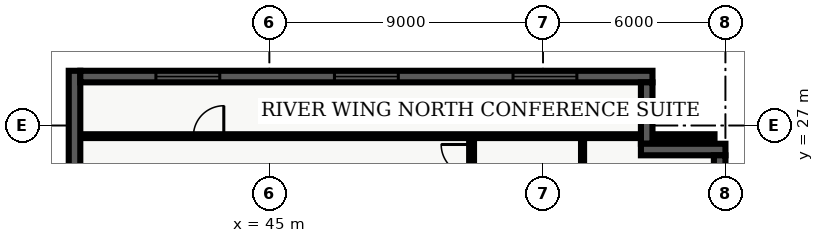
"""IFC4 building model, lengths in metres.
Left out: names, types, materials, properties, quantities, classifications, styles, units other than length and angle.
Written with IfcOpenShell. Run it as: python <this file> out.ifc"""

import sys

from ifc_helpers import new_model, entity, si_unit, converted_unit, direction, frame, origin_with_axes, origin_2d_with_axis, place, context, subcontext, project, spatial, polyline, rectangle, outline, extrude, element, fill, save


model = new_model("IFC4")
c1 = context("Model", 3, precision=1e-05, world=origin_with_axes(), true_north=direction((0.0, 1.0)))
c2 = subcontext(c1, "Body", "Model", "MODEL_VIEW")
j1 = project(units=[si_unit("LENGTHUNIT", "METRE"), converted_unit("PLANEANGLEUNIT", "DEGREE", entity("IfcPlaneAngleMeasure", 0.017), si_unit("PLANEANGLEUNIT", "RADIAN"), dimensions=[0, 0, 0, 0, 0, 0, 0])], contexts=[c1])
p1 = place(None, origin_with_axes())
s1 = spatial("IfcSite", under=j1, at=p1, CompositionType="ELEMENT")
p2 = place(p1, origin_with_axes())
s2 = spatial("IfcBuilding", under=s1, at=p2, CompositionType="ELEMENT")
p3 = place(p2, frame((0.0, 0.0, 44.4), z_axis=(0.0, 0.0, 1.0), x_axis=(1.0, 0.0, 0.0)))
s3 = spatial("IfcBuildingStorey", under=s2, at=p3, CompositionType="ELEMENT", Elevation=44.4)
p4 = place(p3, frame((51.65, 7.85, 0.0), z_axis=(0.0, 0.0, 1.0), x_axis=(0.0, 1.0, 0.0)))
e1 = element("IfcWall", 1, at=p4, inside=s3, PredefinedType="PARTITIONING", context=c2, shape_type="SweptSolid", body=[
    extrude(outline(polyline([(0.0, -0.08), (18.8, -0.08), (18.8, 0.08), (0.0, 0.08), (0.0, -0.08)])), origin_with_axes(), (0.0, 0.0, 1.0), 2.7),
])
p5 = place(p4, frame((0.703, 0.0, 0.0), z_axis=(0.0, 0.0, 1.0), x_axis=(1.0, 0.0, 0.0)))
e2 = element("IfcOpeningElement", 2, at=p5, cuts=e1, PredefinedType="OPENING", context=c2, shape_type="SweptSolid", body=[
    extrude(rectangle(XDim=0.9, YDim=0.18, at=origin_2d_with_axis()), origin_with_axes(), (0.0, 0.0, 1.0), 2.15),
])
p6 = place(p4, frame((5.962, 0.0, 0.0), z_axis=(0.0, 0.0, 1.0), x_axis=(1.0, 0.0, 0.0)))
e3 = element("IfcOpeningElement", 3, at=p6, cuts=e1, PredefinedType="OPENING", context=c2, shape_type="SweptSolid", body=[
    extrude(rectangle(XDim=1.0, YDim=0.18, at=origin_2d_with_axis()), origin_with_axes(), (0.0, 0.0, 1.0), 2.15),
])
p7 = place(p4, frame((11.795, 0.0, 0.0), z_axis=(0.0, 0.0, 1.0), x_axis=(1.0, 0.0, 0.0)))
e4 = element("IfcOpeningElement", 4, at=p7, cuts=e1, PredefinedType="OPENING", context=c2, shape_type="SweptSolid", body=[
    extrude(rectangle(XDim=1.0, YDim=0.18, at=origin_2d_with_axis()), origin_with_axes(), (0.0, 0.0, 1.0), 2.15),
])
p8 = place(p4, frame((18.026, 0.0, 0.0), z_axis=(0.0, 0.0, 1.0), x_axis=(1.0, 0.0, 0.0)))
e5 = element("IfcOpeningElement", 5, at=p8, cuts=e1, PredefinedType="OPENING", context=c2, shape_type="SweptSolid", body=[
    extrude(rectangle(XDim=1.0, YDim=0.18, at=origin_2d_with_axis()), origin_with_axes(), (0.0, 0.0, 1.0), 2.15),
])
p9 = place(p3, frame((38.76, 26.65, 0.0), z_axis=(0.0, 0.0, 1.0), x_axis=(1.0, 0.0, 0.0)))
e6 = element("IfcWall", 6, at=p9, inside=s3, PredefinedType="PARTITIONING", context=c2, shape_type="SweptSolid", body=[
    extrude(outline(polyline([(0.0, -0.062), (20.88, -0.062), (20.88, 0.062), (0.0, 0.062), (0.0, -0.062)])), origin_with_axes(), (0.0, 0.0, 1.0), 2.7),
])
p10 = place(p9, frame((4.24, 0.0, 0.0), z_axis=(0.0, 0.0, 1.0), x_axis=(1.0, 0.0, 0.0)))
e7 = element("IfcOpeningElement", 7, at=p10, cuts=e6, PredefinedType="OPENING", context=c2, shape_type="SweptSolid", body=[
    extrude(rectangle(XDim=1.0, YDim=0.145, at=origin_2d_with_axis()), origin_with_axes(), (0.0, 0.0, 1.0), 2.15),
])
p11 = place(p3, frame((55.3, 7.98, 0.0), z_axis=(0.0, 0.0, 1.0), x_axis=(0.0, 1.0, 0.0)))
e8 = element("IfcWall", 8, at=p11, inside=s3, PredefinedType="PARTITIONING", context=c2, shape_type="SweptSolid", body=[
    extrude(outline(polyline([(0.0, -0.05), (18.54, -0.05), (18.54, 0.05), (0.0, 0.05), (0.0, -0.05)])), origin_with_axes(), (0.0, 0.0, 1.0), 2.7),
])
p12 = place(p11, frame((1.823, 0.0, 0.0), z_axis=(0.0, 0.0, 1.0), x_axis=(1.0, 0.0, 0.0)))
e9 = element("IfcOpeningElement", 9, at=p12, cuts=e8, PredefinedType="OPENING", context=c2, shape_type="SweptSolid", body=[
    extrude(rectangle(XDim=0.95, YDim=0.12, at=origin_2d_with_axis()), origin_with_axes(), (0.0, 0.0, 1.0), 2.15),
])
p13 = place(p11, frame((5.832, 0.0, 0.0), z_axis=(0.0, 0.0, 1.0), x_axis=(1.0, 0.0, 0.0)))
e10 = element("IfcOpeningElement", 10, at=p13, cuts=e8, PredefinedType="OPENING", context=c2, shape_type="SweptSolid", body=[
    extrude(rectangle(XDim=0.95, YDim=0.12, at=origin_2d_with_axis()), origin_with_axes(), (0.0, 0.0, 1.0), 2.15),
])
p14 = place(p11, frame((10.415, 0.0, 0.0), z_axis=(0.0, 0.0, 1.0), x_axis=(1.0, 0.0, 0.0)))
e11 = element("IfcOpeningElement", 11, at=p14, cuts=e8, PredefinedType="OPENING", context=c2, shape_type="SweptSolid", body=[
    extrude(rectangle(XDim=0.95, YDim=0.12, at=origin_2d_with_axis()), origin_with_axes(), (0.0, 0.0, 1.0), 2.15),
])
p15 = place(p11, frame((15.745, 0.0, 0.0), z_axis=(0.0, 0.0, 1.0), x_axis=(1.0, 0.0, 0.0)))
e12 = element("IfcOpeningElement", 12, at=p15, cuts=e8, PredefinedType="OPENING", context=c2, shape_type="SweptSolid", body=[
    extrude(rectangle(XDim=0.95, YDim=0.12, at=origin_2d_with_axis()), origin_with_axes(), (0.0, 0.0, 1.0), 2.15),
])
p16 = place(p3, frame((38.59, 21.22, 0.0), z_axis=(0.0, 0.0, 1.0), x_axis=(0.0, 1.0, 0.0)))
e13 = element("IfcWall", 13, at=p16, inside=s3, PredefinedType="SOLIDWALL", context=c2, shape_type="SweptSolid", body=[
    extrude(outline(polyline([(0.0, -0.19), (7.58, -0.19), (7.58, 0.19), (0.0, 0.19), (0.0, -0.19)])), origin_with_axes(), (0.0, 0.0, 1.0), 3.66),
])
p17 = place(p3, frame((38.78, 28.61, 0.0), z_axis=(0.0, 0.0, 1.0), x_axis=(1.0, 0.0, 0.0)))
e14 = element("IfcWall", 14, at=p17, inside=s3, PredefinedType="SOLIDWALL", context=c2, shape_type="SweptSolid", body=[
    extrude(outline(polyline([(0.0, -0.19), (18.82, -0.19), (18.82, 0.19), (0.0, 0.19), (0.0, -0.19)])), origin_with_axes(), (0.0, 0.0, 1.0), 3.66),
])
p18 = place(p17, frame((3.537, 0.0, 0.45), z_axis=(0.0, 0.0, 1.0), x_axis=(1.0, 0.0, 0.0)))
e15 = element("IfcOpeningElement", 15, at=p18, cuts=e14, PredefinedType="OPENING", context=c2, shape_type="SweptSolid", body=[
    extrude(rectangle(XDim=2.1, YDim=0.4, at=origin_2d_with_axis()), origin_with_axes(), (0.0, 0.0, 1.0), 2.2),
])
p19 = place(p17, frame((9.41, 0.0, 0.45), z_axis=(0.0, 0.0, 1.0), x_axis=(1.0, 0.0, 0.0)))
e16 = element("IfcOpeningElement", 16, at=p19, cuts=e14, PredefinedType="OPENING", context=c2, shape_type="SweptSolid", body=[
    extrude(rectangle(XDim=2.1, YDim=0.4, at=origin_2d_with_axis()), origin_with_axes(), (0.0, 0.0, 1.0), 2.2),
])
p20 = place(p17, frame((15.283, 0.0, 0.45), z_axis=(0.0, 0.0, 1.0), x_axis=(1.0, 0.0, 0.0)))
e17 = element("IfcOpeningElement", 17, at=p20, cuts=e14, PredefinedType="OPENING", context=c2, shape_type="SweptSolid", body=[
    extrude(rectangle(XDim=2.1, YDim=0.4, at=origin_2d_with_axis()), origin_with_axes(), (0.0, 0.0, 1.0), 2.2),
])
p21 = place(p3, frame((57.41, 28.42, 0.0), z_axis=(0.0, 0.0, 1.0), x_axis=(0.0, -1.0, 0.0)))
e18 = element("IfcWall", 18, at=p21, inside=s3, PredefinedType="SOLIDWALL", context=c2, shape_type="SweptSolid", body=[
    extrude(outline(polyline([(0.0, -0.19), (2.02, -0.19), (2.02, 0.19), (0.0, 0.19), (0.0, -0.19)])), origin_with_axes(), (0.0, 0.0, 1.0), 3.66),
])
p22 = place(p3, frame((57.22, 26.21, 0.0), z_axis=(0.0, 0.0, 1.0), x_axis=(1.0, 0.0, 0.0)))
e19 = element("IfcWall", 19, at=p22, inside=s3, PredefinedType="SOLIDWALL", context=c2, shape_type="SweptSolid", body=[
    extrude(outline(polyline([(0.0, -0.19), (2.78, -0.19), (2.78, 0.19), (0.0, 0.19), (0.0, -0.19)])), origin_with_axes(), (0.0, 0.0, 1.0), 3.66),
])
p23 = place(p3, frame((59.81, 26.02, 0.0), z_axis=(0.0, 0.0, 1.0), x_axis=(0.0, -1.0, 0.0)))
e20 = element("IfcWall", 20, at=p23, inside=s3, PredefinedType="SOLIDWALL", context=c2, shape_type="SweptSolid", body=[
    extrude(outline(polyline([(0.0, -0.19), (23.62, -0.19), (23.62, 0.19), (0.0, 0.19), (0.0, -0.19)])), origin_with_axes(), (0.0, 0.0, 1.0), 3.66),
])
p24 = place(p23, frame((20.218, 0.0, 0.45), z_axis=(0.0, 0.0, 1.0), x_axis=(1.0, 0.0, 0.0)))
e21 = element("IfcOpeningElement", 21, at=p24, cuts=e20, PredefinedType="OPENING", context=c2, shape_type="SweptSolid", body=[
    extrude(rectangle(XDim=2.1, YDim=0.4, at=origin_2d_with_axis()), origin_with_axes(), (0.0, 0.0, 1.0), 2.2),
])
p25 = place(p9, frame((4.24, 0.0, 0.0), z_axis=(0.0, 0.0, 1.0), x_axis=(1.0, 0.0, 0.0)))
e22 = element("IfcDoor", 22, at=p25, inside=s3, OperationType="SINGLE_SWING_RIGHT", PredefinedType="DOOR", context=c2, shape_type="SweptSolid", body=[
    extrude(rectangle(XDim=1.0, YDim=0.075, at=origin_2d_with_axis()), origin_with_axes(), (0.0, 0.0, 1.0), 2.15),
])
fill(e7, e22)
p26 = place(p4, frame((18.026, 0.0, 0.0), z_axis=(0.0, 0.0, 1.0), x_axis=(1.0, 0.0, 0.0)))
e23 = element("IfcDoor", 23, at=p26, inside=s3, OperationType="SINGLE_SWING_RIGHT", PredefinedType="DOOR", context=c2, shape_type="SweptSolid", body=[
    extrude(rectangle(XDim=1.0, YDim=0.09, at=origin_2d_with_axis()), origin_with_axes(), (0.0, 0.0, 1.0), 2.15),
])
fill(e5, e23)
p27 = place(p17, frame((3.537, 0.0, 0.45), z_axis=(0.0, 0.0, 1.0), x_axis=(1.0, 0.0, 0.0)))
e24 = element("IfcWindow", 24, at=p27, inside=s3, PredefinedType="WINDOW", context=c2, shape_type="SweptSolid", body=[
    extrude(rectangle(XDim=2.1, YDim=0.09, at=origin_2d_with_axis()), origin_with_axes(), (0.0, 0.0, 1.0), 2.2),
])
fill(e15, e24)
p28 = place(p17, frame((9.41, 0.0, 0.45), z_axis=(0.0, 0.0, 1.0), x_axis=(1.0, 0.0, 0.0)))
e25 = element("IfcWindow", 25, at=p28, inside=s3, PredefinedType="WINDOW", context=c2, shape_type="SweptSolid", body=[
    extrude(rectangle(XDim=2.1, YDim=0.09, at=origin_2d_with_axis()), origin_with_axes(), (0.0, 0.0, 1.0), 2.2),
])
fill(e16, e25)
p29 = place(p17, frame((15.283, 0.0, 0.45), z_axis=(0.0, 0.0, 1.0), x_axis=(1.0, 0.0, 0.0)))
e26 = element("IfcWindow", 26, at=p29, inside=s3, PredefinedType="WINDOW", context=c2, shape_type="SweptSolid", body=[
    extrude(rectangle(XDim=2.1, YDim=0.09, at=origin_2d_with_axis()), origin_with_axes(), (0.0, 0.0, 1.0), 2.2),
])
fill(e17, e26)
save(model, sys.argv[1])
